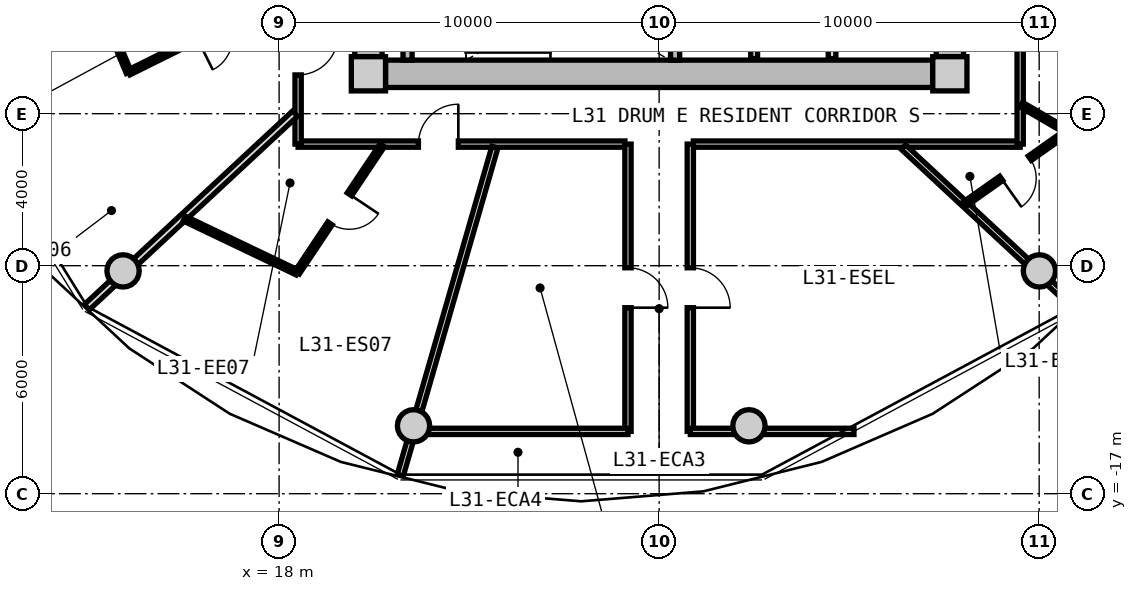
"""IFC4 building model, lengths in metres.
Left out: names, types, materials, properties, quantities, classifications, styles, units other than length and angle.
Written with IfcOpenShell. Run it as: python <this file> out.ifc"""

import sys

from ifc_helpers import new_model, si_unit, direction, frame, frame_2d, origin, origin_2d, place, context, subcontext, project, spatial, rectangle, circle, extrude, source, transform, mapped, element, fill, save


model = new_model("IFC4")
c1 = context("Model", 3, precision=1e-05, world=origin(), true_north=direction((0.0, 1.0)))
c2 = subcontext(c1, "Body", "Model", "MODEL_VIEW")
j1 = project(units=[si_unit("LENGTHUNIT", "METRE"), si_unit("PLANEANGLEUNIT", "RADIAN")], contexts=[c1])
p1 = place(None, origin())
s1 = spatial("IfcSite", under=j1, at=p1, CompositionType="ELEMENT")
p2 = place(p1, origin())
s2 = spatial("IfcBuilding", under=s1, at=p2, CompositionType="ELEMENT")
p3 = place(p2, frame((0.0, 0.0, 102.35)))
s3 = spatial("IfcBuildingStorey", under=s2, at=p3, CompositionType="ELEMENT", Elevation=102.35)
m1 = source(origin(), c2, "Body", "SweptSolid", [
    extrude(rectangle(XDim=0.9, YDim=0.9, at=origin_2d()), origin(), (0.0, 0.0, 1.0), 3.05),
])
for number, where, z_axis, x_axis in (
    (1, (20.35, -5.95, 0.0), (0.0, 0.0, 1.0), (1.0, 0.0, 0.0)),
    (2, (35.65, -5.95, 0.0), (0.0, 0.0, 1.0), (1.0, 0.0, 0.0)),
):
    element("IfcColumn", number, at=place(p3, frame(where, z_axis=z_axis, x_axis=x_axis)), inside=s3, PredefinedType="COLUMN", context=c2, shape_type="MappedRepresentation", body=[
        mapped(m1, transform((0.0, 0.0, 0.0), x_axis=(1.0, 0.0, 0.0), y_axis=(0.0, 1.0, 0.0), z_axis=(0.0, 0.0, 1.0), scale=1.0)),
    ])
m2 = source(origin(), c2, "Body", "SweptSolid", [
    extrude(rectangle(XDim=14.4, YDim=0.72, at=frame_2d((7.2, 0.0))), origin(), (0.0, 0.0, 1.0), 2.79),
])
p4 = place(p3, frame((35.2, -5.95, 0.0), z_axis=(0.0, 0.0, 1.0), x_axis=(-1.0, 0.0, 0.0)))
e3 = element("IfcWall", 3, at=p4, inside=s3, PredefinedType="SHEAR", context=c2, shape_type="MappedRepresentation", body=[
    mapped(m2, transform((0.0, 0.0, 0.0), x_axis=(1.0, 0.0, 0.0), y_axis=(0.0, 1.0, 0.0), z_axis=(0.0, 0.0, 1.0), scale=1.0)),
])
m3 = source(origin(), c2, "Body", "SweptSolid", [
    extrude(rectangle(XDim=11.0, YDim=0.72, at=frame_2d((5.5, 0.0))), origin(), (0.0, 0.0, 1.0), 2.79),
])
p5 = place(p3, frame((20.35, -5.5, 0.0), z_axis=(0.0, 0.0, 1.0), x_axis=(0.0, 1.0, 0.0)))
e4 = element("IfcWall", 4, at=p5, inside=s3, PredefinedType="SHEAR", context=c2, shape_type="MappedRepresentation", body=[
    mapped(m3, transform((0.0, 0.0, 0.0), x_axis=(1.0, 0.0, 0.0), y_axis=(0.0, 1.0, 0.0), z_axis=(0.0, 0.0, 1.0), scale=1.0)),
])
p6 = place(p5, frame((3.8, 0.0, 0.0)))
e5 = element("IfcOpeningElement", 5, at=p6, cuts=e4, PredefinedType="OPENING", context=c2, shape_type="SweptSolid", body=[
    extrude(rectangle(XDim=1.2, YDim=2.15, at=frame_2d((0.6, 1.075))), frame((0.0, 0.37, 0.0), z_axis=(0.0, -1.0, 0.0), x_axis=(1.0, 0.0, 0.0)), (0.0, 0.0, 1.0), 0.74),
])
p7 = place(p3, frame((35.65, 5.5, 0.0), z_axis=(0.0, 0.0, 1.0), x_axis=(0.0, -1.0, 0.0)))
e6 = element("IfcWall", 6, at=p7, inside=s3, PredefinedType="SHEAR", context=c2, shape_type="MappedRepresentation", body=[
    mapped(m3, transform((0.0, 0.0, 0.0), x_axis=(1.0, 0.0, 0.0), y_axis=(0.0, 1.0, 0.0), z_axis=(0.0, 0.0, 1.0), scale=1.0)),
])
p8 = place(p7, frame((5.65, 0.0, 0.0)))
e7 = element("IfcOpeningElement", 7, at=p8, cuts=e6, PredefinedType="OPENING", context=c2, shape_type="SweptSolid", body=[
    extrude(rectangle(XDim=1.2, YDim=2.15, at=frame_2d((0.6, 1.075))), frame((0.0, 0.37, 0.0), z_axis=(0.0, -1.0, 0.0), x_axis=(1.0, 0.0, 0.0)), (0.0, 0.0, 1.0), 0.74),
])
m4 = source(origin(), c2, "Body", "SweptSolid", [
    extrude(circle(Radius=0.425, at=origin_2d()), origin(), (0.0, 0.0, 1.0), 3.05),
])
for number, where, z_axis, x_axis in (
    (8, (13.894, -11.137, 0.0), (0.0, 0.0, 1.0), (1.0, 0.0, 0.0)),
    (9, (21.537, -15.213, 0.0), (0.0, 0.0, 1.0), (1.0, 0.0, 0.0)),
    (10, (30.363, -15.213, 0.0), (0.0, 0.0, 1.0), (1.0, 0.0, 0.0)),
    (11, (38.006, -11.137, 0.0), (0.0, 0.0, 1.0), (1.0, 0.0, 0.0)),
):
    element("IfcColumn", number, at=place(p3, frame(where, z_axis=z_axis, x_axis=x_axis)), inside=s3, PredefinedType="COLUMN", context=c2, shape_type="MappedRepresentation", body=[
        mapped(m4, transform((0.0, 0.0, 0.0), x_axis=(1.0, 0.0, 0.0), y_axis=(0.0, 1.0, 0.0), z_axis=(0.0, 0.0, 1.0), scale=1.0)),
    ])
m5 = source(origin(), c2, "Body", "SweptSolid", [
    extrude(rectangle(XDim=3.14, YDim=0.24, at=frame_2d((1.57, 0.0))), origin(), (0.0, 0.0, 1.0), 2.79),
])
for number, where, z_axis, x_axis in (
    (12, (21.38, -5.59, 0.0), (0.0, 0.0, 1.0), (0.0, 1.0, 0.0)),
    (13, (28.42, -5.59, 0.0), (0.0, 0.0, 1.0), (0.0, 1.0, 0.0)),
):
    element("IfcWall", number, at=place(p3, frame(where, z_axis=z_axis, x_axis=x_axis)), inside=s3, PredefinedType="PARTITIONING", context=c2, shape_type="MappedRepresentation", body=[
        mapped(m5, transform((0.0, 0.0, 0.0), x_axis=(1.0, 0.0, 0.0), y_axis=(0.0, 1.0, 0.0), z_axis=(0.0, 0.0, 1.0), scale=1.0)),
    ])
m6 = source(origin(), c2, "Body", "SweptSolid", [
    extrude(rectangle(XDim=3.8, YDim=0.2, at=frame_2d((1.9, 0.0))), origin(), (0.0, 0.0, 1.0), 2.775),
])
p9 = place(p3, frame((32.55, -5.55, 0.0), z_axis=(0.0, 0.0, 1.0), x_axis=(0.0, 1.0, 0.0)))
e14 = element("IfcWall", 14, at=p9, inside=s3, PredefinedType="PARTITIONING", context=c2, shape_type="MappedRepresentation", body=[
    mapped(m6, transform((0.0, 0.0, 0.0), x_axis=(1.0, 0.0, 0.0), y_axis=(0.0, 1.0, 0.0), z_axis=(0.0, 0.0, 1.0), scale=1.0)),
])
m7 = source(origin(), c2, "Body", "SweptSolid", [
    extrude(rectangle(XDim=3.22, YDim=0.18, at=frame_2d((1.61, 0.0))), origin(), (0.0, 0.0, 1.0), 2.775),
])
p10 = place(p3, frame((30.5, -5.55, 0.0), z_axis=(0.0, 0.0, 1.0), x_axis=(0.0, 1.0, 0.0)))
e15 = element("IfcWall", 15, at=p10, inside=s3, PredefinedType="PARTITIONING", context=c2, shape_type="MappedRepresentation", body=[
    mapped(m7, transform((0.0, 0.0, 0.0), x_axis=(1.0, 0.0, 0.0), y_axis=(0.0, 1.0, 0.0), z_axis=(0.0, 0.0, 1.0), scale=1.0)),
])
m8 = source(origin(), c2, "Body", "SweptSolid", [
    extrude(rectangle(XDim=8.6, YDim=0.165, at=frame_2d((4.3, 0.0))), origin(), (0.0, 0.0, 1.0), 2.775),
])
p11 = place(p3, frame((37.5, -7.8, 0.0), z_axis=(0.0, 0.0, 1.0), x_axis=(-1.0, 0.0, 0.0)))
e16 = element("IfcWall", 16, at=p11, inside=s3, PredefinedType="PARTITIONING", context=c2, shape_type="MappedRepresentation", body=[
    mapped(m8, transform((0.0, 0.0, 0.0), x_axis=(1.0, 0.0, 0.0), y_axis=(0.0, 1.0, 0.0), z_axis=(0.0, 0.0, 1.0), scale=1.0)),
])
p12 = place(p3, frame((27.1, -7.8, 0.0), z_axis=(0.0, 0.0, 1.0), x_axis=(-1.0, 0.0, 0.0)))
e17 = element("IfcWall", 17, at=p12, inside=s3, PredefinedType="PARTITIONING", context=c2, shape_type="MappedRepresentation", body=[
    mapped(m8, transform((0.0, 0.0, 0.0), x_axis=(1.0, 0.0, 0.0), y_axis=(0.0, 1.0, 0.0), z_axis=(0.0, 0.0, 1.0), scale=1.0)),
])
p13 = place(p12, frame((4.384, 0.0, 0.0)))
e18 = element("IfcOpeningElement", 18, at=p13, cuts=e17, PredefinedType="OPENING", context=c2, shape_type="SweptSolid", body=[
    extrude(rectangle(XDim=1.05, YDim=2.15, at=frame_2d((0.525, 1.075))), frame((0.0, 0.093, 0.0), z_axis=(0.0, -1.0, 0.0), x_axis=(1.0, 0.0, 0.0)), (0.0, 0.0, 1.0), 0.185),
])
m9 = source(origin(), c2, "Body", "SweptSolid", [
    extrude(rectangle(XDim=15.6, YDim=0.165, at=frame_2d((7.8, 0.0))), origin(), (0.0, 0.0, 1.0), 2.775),
])
p14 = place(p3, frame((18.5, -7.8, 0.0), z_axis=(0.0, 0.0, 1.0), x_axis=(0.0, 1.0, 0.0)))
e19 = element("IfcWall", 19, at=p14, inside=s3, PredefinedType="PARTITIONING", context=c2, shape_type="MappedRepresentation", body=[
    mapped(m9, transform((0.0, 0.0, 0.0), x_axis=(1.0, 0.0, 0.0), y_axis=(0.0, 1.0, 0.0), z_axis=(0.0, 0.0, 1.0), scale=1.0)),
])
p15 = place(p14, frame((10.383, 0.0, 0.0)))
e20 = element("IfcOpeningElement", 20, at=p15, cuts=e19, PredefinedType="OPENING", context=c2, shape_type="SweptSolid", body=[
    extrude(rectangle(XDim=1.05, YDim=2.15, at=frame_2d((0.525, 1.075))), frame((0.0, 0.093, 0.0), z_axis=(0.0, -1.0, 0.0), x_axis=(1.0, 0.0, 0.0)), (0.0, 0.0, 1.0), 0.185),
])
p16 = place(p14, frame((6.419, 0.0, 0.0)))
e21 = element("IfcOpeningElement", 21, at=p16, cuts=e19, PredefinedType="OPENING", context=c2, shape_type="SweptSolid", body=[
    extrude(rectangle(XDim=1.05, YDim=2.15, at=frame_2d((0.525, 1.075))), frame((0.0, 0.093, 0.0), z_axis=(0.0, -1.0, 0.0), x_axis=(1.0, 0.0, 0.0)), (0.0, 0.0, 1.0), 0.185),
])
p17 = place(p14, frame((1.821, 0.0, 0.0)))
e22 = element("IfcOpeningElement", 22, at=p17, cuts=e19, PredefinedType="OPENING", context=c2, shape_type="SweptSolid", body=[
    extrude(rectangle(XDim=1.05, YDim=2.15, at=frame_2d((0.525, 1.075))), frame((0.0, 0.093, 0.0), z_axis=(0.0, -1.0, 0.0), x_axis=(1.0, 0.0, 0.0)), (0.0, 0.0, 1.0), 0.185),
])
p18 = place(p3, frame((37.5, 7.8, 0.0), z_axis=(0.0, 0.0, 1.0), x_axis=(0.0, -1.0, 0.0)))
e23 = element("IfcWall", 23, at=p18, inside=s3, PredefinedType="PARTITIONING", context=c2, shape_type="MappedRepresentation", body=[
    mapped(m9, transform((0.0, 0.0, 0.0), x_axis=(1.0, 0.0, 0.0), y_axis=(0.0, 1.0, 0.0), z_axis=(0.0, 0.0, 1.0), scale=1.0)),
])
p19 = place(p18, frame((6.87, 0.0, 0.0)))
e24 = element("IfcOpeningElement", 24, at=p19, cuts=e23, PredefinedType="OPENING", context=c2, shape_type="SweptSolid", body=[
    extrude(rectangle(XDim=1.05, YDim=2.15, at=frame_2d((0.525, 1.075))), frame((0.0, 0.093, 0.0), z_axis=(0.0, -1.0, 0.0), x_axis=(1.0, 0.0, 0.0)), (0.0, 0.0, 1.0), 0.185),
])
m10 = source(origin(), c2, "Body", "SweptSolid", [
    extrude(rectangle(XDim=8.989, YDim=0.165, at=frame_2d((4.495, 0.0))), origin(), (0.0, 0.0, 1.0), 2.275),
])
p20 = place(p3, frame((23.678, -7.88, 0.0), z_axis=(0.0, 0.0, 1.0), x_axis=(-0.27702323008, -0.960863221274, 0.0)))
e25 = element("IfcWall", 25, at=p20, inside=s3, PredefinedType="PARTITIONING", context=c2, shape_type="MappedRepresentation", body=[
    mapped(m10, transform((0.0, 0.0, 0.0), x_axis=(1.0, 0.0, 0.0), y_axis=(0.0, 1.0, 0.0), z_axis=(0.0, 0.0, 1.0), scale=1.0)),
])
m11 = source(origin(), c2, "Body", "SweptSolid", [
    extrude(rectangle(XDim=6.187, YDim=0.165, at=frame_2d((3.093, 0.0))), origin(), (0.0, 0.0, 1.0), 2.275),
])
p21 = place(p3, frame((34.429, -7.88, 0.0), z_axis=(0.0, 0.0, 1.0), x_axis=(0.732501077882, -0.680765870841, 0.0)))
e26 = element("IfcWall", 26, at=p21, inside=s3, PredefinedType="PARTITIONING", context=c2, shape_type="MappedRepresentation", body=[
    mapped(m11, transform((0.0, 0.0, 0.0), x_axis=(1.0, 0.0, 0.0), y_axis=(0.0, 1.0, 0.0), z_axis=(0.0, 0.0, 1.0), scale=1.0)),
])
m12 = source(origin(), c2, "Body", "SweptSolid", [
    extrude(rectangle(XDim=7.56, YDim=0.165, at=frame_2d((3.78, 0.0))), origin(), (0.0, 0.0, 1.0), 2.775),
])
p22 = place(p3, frame((27.18, -15.36, 0.0), z_axis=(0.0, 0.0, 1.0), x_axis=(0.0, 1.0, 0.0)))
e27 = element("IfcWall", 27, at=p22, inside=s3, PredefinedType="PARTITIONING", context=c2, shape_type="MappedRepresentation", body=[
    mapped(m12, transform((0.0, 0.0, 0.0), x_axis=(1.0, 0.0, 0.0), y_axis=(0.0, 1.0, 0.0), z_axis=(0.0, 0.0, 1.0), scale=1.0)),
])
p23 = place(p22, frame((3.255, 0.0, 0.0)))
e28 = element("IfcOpeningElement", 28, at=p23, cuts=e27, PredefinedType="OPENING", context=c2, shape_type="SweptSolid", body=[
    extrude(rectangle(XDim=1.05, YDim=2.15, at=frame_2d((0.525, 1.075))), frame((0.0, 0.093, 0.0), z_axis=(0.0, -1.0, 0.0), x_axis=(1.0, 0.0, 0.0)), (0.0, 0.0, 1.0), 0.185),
])
m13 = source(origin(), c2, "Body", "SweptSolid", [
    extrude(rectangle(XDim=5.814, YDim=0.165, at=frame_2d((2.907, 0.0))), origin(), (0.0, 0.0, 1.0), 2.275),
])
p24 = place(p3, frame((21.366, -15.36, 0.0), z_axis=(0.0, 0.0, 1.0), x_axis=(1.0, 0.0, 0.0)))
e29 = element("IfcWall", 29, at=p24, inside=s3, PredefinedType="PARTITIONING", context=c2, shape_type="MappedRepresentation", body=[
    mapped(m13, transform((0.0, 0.0, 0.0), x_axis=(1.0, 0.0, 0.0), y_axis=(0.0, 1.0, 0.0), z_axis=(0.0, 0.0, 1.0), scale=1.0)),
])
p25 = place(p3, frame((28.82, -15.36, 0.0), z_axis=(0.0, 0.0, 1.0), x_axis=(0.0, 1.0, 0.0)))
e30 = element("IfcWall", 30, at=p25, inside=s3, PredefinedType="PARTITIONING", context=c2, shape_type="MappedRepresentation", body=[
    mapped(m12, transform((0.0, 0.0, 0.0), x_axis=(1.0, 0.0, 0.0), y_axis=(0.0, 1.0, 0.0), z_axis=(0.0, 0.0, 1.0), scale=1.0)),
])
p26 = place(p25, frame((3.255, 0.0, 0.0)))
e31 = element("IfcOpeningElement", 31, at=p26, cuts=e30, PredefinedType="OPENING", context=c2, shape_type="SweptSolid", body=[
    extrude(rectangle(XDim=1.05, YDim=2.15, at=frame_2d((0.525, 1.075))), frame((0.0, 0.093, 0.0), z_axis=(0.0, -1.0, 0.0), x_axis=(1.0, 0.0, 0.0)), (0.0, 0.0, 1.0), 0.185),
])
m14 = source(origin(), c2, "Body", "SweptSolid", [
    extrude(rectangle(XDim=4.307, YDim=0.165, at=frame_2d((2.153, 0.0))), origin(), (0.0, 0.0, 1.0), 2.275),
])
p27 = place(p3, frame((28.82, -15.36, 0.0), z_axis=(0.0, 0.0, 1.0), x_axis=(1.0, 0.0, 0.0)))
e32 = element("IfcWall", 32, at=p27, inside=s3, PredefinedType="PARTITIONING", context=c2, shape_type="MappedRepresentation", body=[
    mapped(m14, transform((0.0, 0.0, 0.0), x_axis=(1.0, 0.0, 0.0), y_axis=(0.0, 1.0, 0.0), z_axis=(0.0, 0.0, 1.0), scale=1.0)),
])
m15 = source(origin(), c2, "Body", "SweptSolid", [
    extrude(rectangle(XDim=7.482, YDim=0.19, at=frame_2d((3.741, 0.0))), origin(), (0.0, 0.0, 1.0), 2.275),
])
p28 = place(p3, frame((18.42, -6.998, 0.0), z_axis=(0.0, 0.0, 1.0), x_axis=(-0.732508698043, -0.680757671489, 0.0)))
e33 = element("IfcWall", 33, at=p28, inside=s3, PredefinedType="PARTITIONING", context=c2, shape_type="MappedRepresentation", body=[
    mapped(m15, transform((0.0, 0.0, 0.0), x_axis=(1.0, 0.0, 0.0), y_axis=(0.0, 1.0, 0.0), z_axis=(0.0, 0.0, 1.0), scale=1.0)),
])
m16 = source(origin(), c2, "Body", "SweptSolid", [
    extrude(rectangle(XDim=4.941, YDim=0.14, at=frame_2d((2.471, 0.0))), origin(), (0.0, 0.0, 1.0), 2.775),
])
p29 = place(p3, frame((18.47, -3.717, 0.0), z_axis=(0.0, 0.0, 1.0), x_axis=(-0.89555083256, -0.444959218694, 0.0)))
e34 = element("IfcWall", 34, at=p29, inside=s3, PredefinedType="PARTITIONING", context=c2, shape_type="MappedRepresentation", body=[
    mapped(m16, transform((0.0, 0.0, 0.0), x_axis=(1.0, 0.0, 0.0), y_axis=(0.0, 1.0, 0.0), z_axis=(0.0, 0.0, 1.0), scale=1.0)),
])
p30 = place(p29, frame((2.011, 0.0, 0.0)))
e35 = element("IfcOpeningElement", 35, at=p30, cuts=e34, PredefinedType="OPENING", context=c2, shape_type="SweptSolid", body=[
    extrude(rectangle(XDim=0.92, YDim=2.1, at=frame_2d((0.46, 1.05))), frame((0.0, 0.08, 0.0), z_axis=(0.0, -1.0, 0.0), x_axis=(1.0, 0.0, 0.0)), (0.0, 0.0, 1.0), 0.16),
])
m17 = source(origin(), c2, "Body", "SweptSolid", [
    extrude(rectangle(XDim=2.88, YDim=0.14, at=frame_2d((1.44, 0.0))), origin(), (0.0, 0.0, 1.0), 2.415),
])
p31 = place(p3, frame((14.045, -5.915, 0.0), z_axis=(0.0, 0.0, 1.0), x_axis=(-0.38878819597, 0.921327161585, 0.0)))
e36 = element("IfcWall", 36, at=p31, inside=s3, PredefinedType="PARTITIONING", context=c2, shape_type="MappedRepresentation", body=[
    mapped(m17, transform((0.0, 0.0, 0.0), x_axis=(1.0, 0.0, 0.0), y_axis=(0.0, 1.0, 0.0), z_axis=(0.0, 0.0, 1.0), scale=1.0)),
])
m18 = source(origin(), c2, "Body", "SweptSolid", [
    extrude(rectangle(XDim=4.027, YDim=0.14, at=frame_2d((2.014, 0.0))), origin(), (0.0, 0.0, 1.0), 2.775),
])
p32 = place(p3, frame((20.714, -7.83, 0.0), z_axis=(0.0, 0.0, 1.0), x_axis=(-0.555832825922, -0.831294093343, 0.0)))
e37 = element("IfcWall", 37, at=p32, inside=s3, PredefinedType="PARTITIONING", context=c2, shape_type="MappedRepresentation", body=[
    mapped(m18, transform((0.0, 0.0, 0.0), x_axis=(1.0, 0.0, 0.0), y_axis=(0.0, 1.0, 0.0), z_axis=(0.0, 0.0, 1.0), scale=1.0)),
])
p33 = place(p32, frame((1.554, 0.0, 0.0)))
e38 = element("IfcOpeningElement", 38, at=p33, cuts=e37, PredefinedType="OPENING", context=c2, shape_type="SweptSolid", body=[
    extrude(rectangle(XDim=0.92, YDim=2.1, at=frame_2d((0.46, 1.05))), frame((0.0, 0.08, 0.0), z_axis=(0.0, -1.0, 0.0), x_axis=(1.0, 0.0, 0.0)), (0.0, 0.0, 1.0), 0.16),
])
m19 = source(origin(), c2, "Body", "SweptSolid", [
    extrude(rectangle(XDim=3.291, YDim=0.14, at=frame_2d((1.646, 0.0))), origin(), (0.0, 0.0, 1.0), 2.775),
])
p34 = place(p3, frame((18.476, -11.178, 0.0), z_axis=(0.0, 0.0, 1.0), x_axis=(-0.902381393443, 0.430938302739, 0.0)))
e39 = element("IfcWall", 39, at=p34, inside=s3, PredefinedType="PARTITIONING", context=c2, shape_type="MappedRepresentation", body=[
    mapped(m19, transform((0.0, 0.0, 0.0), x_axis=(1.0, 0.0, 0.0), y_axis=(0.0, 1.0, 0.0), z_axis=(0.0, 0.0, 1.0), scale=1.0)),
])
m20 = source(origin(), c2, "Body", "SweptSolid", [
    extrude(rectangle(XDim=1.407, YDim=0.14, at=frame_2d((0.704, 0.0))), origin(), (0.0, 0.0, 1.0), 2.775),
])
p35 = place(p3, frame((37.53, -6.762, 0.0), z_axis=(0.0, 0.0, 1.0), x_axis=(0.863539718977, -0.504280828258, 0.0)))
e40 = element("IfcWall", 40, at=p35, inside=s3, PredefinedType="PARTITIONING", context=c2, shape_type="MappedRepresentation", body=[
    mapped(m20, transform((0.0, 0.0, 0.0), x_axis=(1.0, 0.0, 0.0), y_axis=(0.0, 1.0, 0.0), z_axis=(0.0, 0.0, 1.0), scale=1.0)),
])
m21 = source(origin(), c2, "Body", "SweptSolid", [
    extrude(rectangle(XDim=3.347, YDim=0.14, at=frame_2d((1.673, 0.0))), origin(), (0.0, 0.0, 1.0), 2.775),
])
p36 = place(p3, frame((38.745, -7.472, 0.0), z_axis=(0.0, 0.0, 1.0), x_axis=(-0.81705680263, -0.576557179537, 0.0)))
e41 = element("IfcWall", 41, at=p36, inside=s3, PredefinedType="PARTITIONING", context=c2, shape_type="MappedRepresentation", body=[
    mapped(m21, transform((0.0, 0.0, 0.0), x_axis=(1.0, 0.0, 0.0), y_axis=(0.0, 1.0, 0.0), z_axis=(0.0, 0.0, 1.0), scale=1.0)),
])
p37 = place(p36, frame((1.214, 0.0, 0.0)))
e42 = element("IfcOpeningElement", 42, at=p37, cuts=e41, PredefinedType="OPENING", context=c2, shape_type="SweptSolid", body=[
    extrude(rectangle(XDim=0.92, YDim=2.1, at=frame_2d((0.46, 1.05))), frame((0.0, 0.08, 0.0), z_axis=(0.0, -1.0, 0.0), x_axis=(1.0, 0.0, 0.0)), (0.0, 0.0, 1.0), 0.16),
])
m22 = source(origin(), c2, "Body", "SweptSolid", [
    extrude(rectangle(XDim=1.05, YDim=2.15, at=frame_2d((0.525, 1.075))), frame((0.0, 0.025, 0.0), z_axis=(0.0, -1.0, 0.0), x_axis=(1.0, 0.0, 0.0)), (0.0, 0.0, 1.0), 0.05),
])
p38 = place(p23, frame((1.05, 0.0, 0.0), z_axis=(0.0, 0.0, 1.0), x_axis=(-1.0, 0.0, 0.0)))
e43 = element("IfcDoor", 43, at=p38, inside=s3, OperationType="SINGLE_SWING_RIGHT", PredefinedType="DOOR", context=c2, shape_type="MappedRepresentation", body=[
    mapped(m22, transform((0.0, 0.0, 0.0), x_axis=(1.0, 0.0, 0.0), y_axis=(0.0, 1.0, 0.0), z_axis=(0.0, 0.0, 1.0), scale=1.0)),
])
fill(e28, e43)
p39 = place(p26, frame((1.05, 0.0, 0.0), z_axis=(0.0, 0.0, 1.0), x_axis=(-1.0, 0.0, 0.0)))
e44 = element("IfcDoor", 44, at=p39, inside=s3, OperationType="SINGLE_SWING_RIGHT", PredefinedType="DOOR", context=c2, shape_type="MappedRepresentation", body=[
    mapped(m22, transform((0.0, 0.0, 0.0), x_axis=(1.0, 0.0, 0.0), y_axis=(0.0, 1.0, 0.0), z_axis=(0.0, 0.0, 1.0), scale=1.0)),
])
fill(e31, e44)
p40 = place(p17, frame((1.05, 0.0, 0.0), z_axis=(0.0, 0.0, 1.0), x_axis=(-1.0, 0.0, 0.0)))
e45 = element("IfcDoor", 45, at=p40, inside=s3, OperationType="SINGLE_SWING_LEFT", PredefinedType="DOOR", context=c2, shape_type="MappedRepresentation", body=[
    mapped(m22, transform((0.0, 0.0, 0.0), x_axis=(1.0, 0.0, 0.0), y_axis=(0.0, 1.0, 0.0), z_axis=(0.0, 0.0, 1.0), scale=1.0)),
])
fill(e22, e45)
p41 = place(p13, frame((1.05, 0.0, 0.0), z_axis=(0.0, 0.0, 1.0), x_axis=(-1.0, 0.0, 0.0)))
e46 = element("IfcDoor", 46, at=p41, inside=s3, OperationType="SINGLE_SWING_RIGHT", PredefinedType="DOOR", context=c2, shape_type="MappedRepresentation", body=[
    mapped(m22, transform((0.0, 0.0, 0.0), x_axis=(1.0, 0.0, 0.0), y_axis=(0.0, 1.0, 0.0), z_axis=(0.0, 0.0, 1.0), scale=1.0)),
])
fill(e18, e46)
m23 = source(origin(), c2, "Body", "SweptSolid", [
    extrude(rectangle(XDim=0.92, YDim=2.1, at=frame_2d((0.46, 1.05))), frame((0.0, 0.025, 0.0), z_axis=(0.0, -1.0, 0.0), x_axis=(1.0, 0.0, 0.0)), (0.0, 0.0, 1.0), 0.05),
])
p42 = place(p33, origin())
e47 = element("IfcDoor", 47, at=p42, inside=s3, OperationType="SINGLE_SWING_LEFT", PredefinedType="DOOR", context=c2, shape_type="MappedRepresentation", body=[
    mapped(m23, transform((0.0, 0.0, 0.0), x_axis=(1.0, 0.0, 0.0), y_axis=(0.0, 1.0, 0.0), z_axis=(0.0, 0.0, 1.0), scale=1.0)),
])
fill(e38, e47)
p43 = place(p37, origin())
e48 = element("IfcDoor", 48, at=p43, inside=s3, OperationType="SINGLE_SWING_RIGHT", PredefinedType="DOOR", context=c2, shape_type="MappedRepresentation", body=[
    mapped(m23, transform((0.0, 0.0, 0.0), x_axis=(1.0, 0.0, 0.0), y_axis=(0.0, 1.0, 0.0), z_axis=(0.0, 0.0, 1.0), scale=1.0)),
])
fill(e42, e48)
save(model, sys.argv[1])
